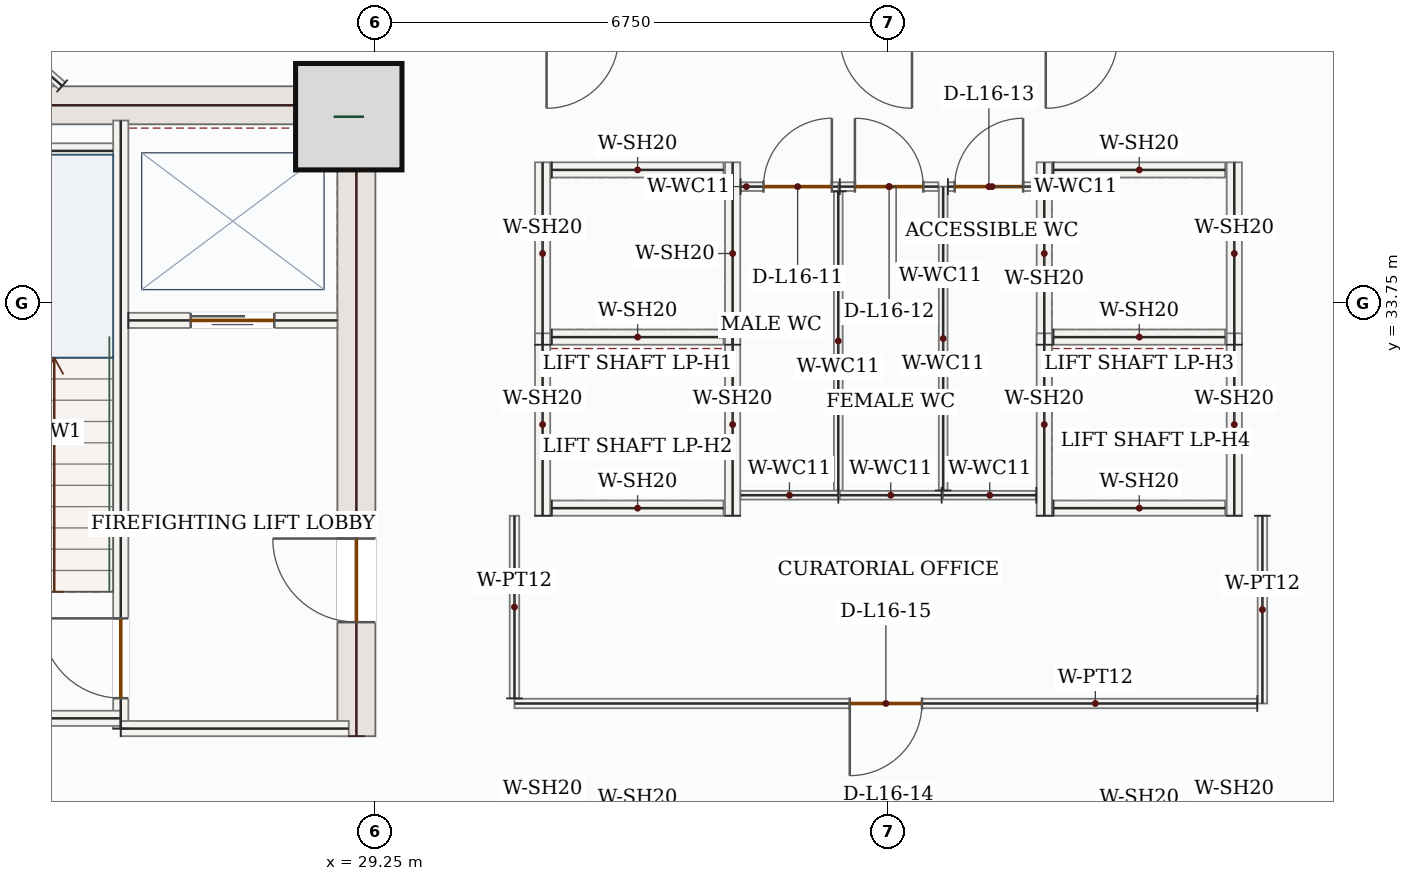
"""IFC4 building model, lengths in metres.
Left out: names, types, materials, properties, quantities, classifications, styles, units other than length and angle.
Written with IfcOpenShell. Run it as: python <this file> out.ifc"""

import sys

from ifc_helpers import new_model, si_unit, direction, frame, frame_2d, origin, origin_2d, place, context, subcontext, project, spatial, rectangle, extrude, source, transform, mapped, element, fill, save


model = new_model("IFC4")
c1 = context("Model", 3, precision=1e-05, world=origin(), true_north=direction((0.0, 1.0)))
c2 = subcontext(c1, "Body", "Model", "MODEL_VIEW")
j1 = project(units=[si_unit("LENGTHUNIT", "METRE"), si_unit("PLANEANGLEUNIT", "RADIAN")], contexts=[c1])
p1 = place(None, origin())
s1 = spatial("IfcSite", under=j1, at=p1, CompositionType="ELEMENT")
p2 = place(p1, origin())
s2 = spatial("IfcBuilding", under=s1, at=p2, CompositionType="ELEMENT")
p3 = place(p2, frame((0.0, 0.0, 75.3)))
s3 = spatial("IfcBuildingStorey", under=s2, at=p3, CompositionType="ELEMENT", Elevation=75.3)
p4 = place(p3, frame((29.0, 28.05, 0.0), z_axis=(0.0, 0.0, 1.0), x_axis=(0.0, 1.0, 0.0)))
e1 = element("IfcWall", 1, at=p4, inside=s3, PredefinedType="SHEAR", context=c2, shape_type="SweptSolid", body=[
    extrude(rectangle(XDim=8.55, YDim=0.5, at=frame_2d((4.275, 0.0))), origin(), (0.0, 0.0, 1.0), 3.95),
])
p5 = place(p4, frame((1.5, 0.0, 0.0)))
e2 = element("IfcOpeningElement", 2, at=p5, cuts=e1, PredefinedType="OPENING", context=c2, shape_type="SweptSolid", body=[
    extrude(rectangle(XDim=1.1, YDim=2.2, at=frame_2d((0.55, 1.1))), frame((0.0, 0.26, 0.0), z_axis=(0.0, -1.0, 0.0), x_axis=(1.0, 0.0, 0.0)), (0.0, 0.0, 1.0), 0.52),
])
m1 = source(origin(), c2, "Body", "SweptSolid", [
    extrude(rectangle(XDim=7.0, YDim=0.5, at=frame_2d((3.5, 0.0))), origin(), (0.0, 0.0, 1.0), 3.95),
])
p6 = place(p3, frame((21.75, 36.35, 0.0), z_axis=(0.0, 0.0, 1.0), x_axis=(1.0, 0.0, 0.0)))
e3 = element("IfcWall", 3, at=p6, inside=s3, PredefinedType="SHEAR", context=c2, shape_type="MappedRepresentation", body=[
    mapped(m1, transform((0.0, 0.0, 0.0), x_axis=(1.0, 0.0, 0.0), y_axis=(0.0, 1.0, 0.0), z_axis=(0.0, 0.0, 1.0), scale=1.0)),
])
m2 = source(origin(), c2, "Body", "SweptSolid", [
    extrude(rectangle(XDim=1.4, YDim=1.4, at=origin_2d()), origin(), (0.0, 0.0, 1.0), 4.2),
])
p7 = place(p3, frame((28.9, 36.2, 0.0), z_axis=(0.0, 0.0, 1.0), x_axis=(1.0, 0.0, 0.0)))
e4 = element("IfcColumn", 4, at=p7, inside=s3, PredefinedType="COLUMN", context=c2, shape_type="MappedRepresentation", body=[
    mapped(m2, transform((0.0, 0.0, 0.0), x_axis=(1.0, 0.0, 0.0), y_axis=(0.0, 1.0, 0.0), z_axis=(0.0, 0.0, 1.0), scale=1.0)),
])
p8 = place(p3, frame((25.9, 28.15, 0.0), z_axis=(0.0, 0.0, 1.0), x_axis=(0.0, 1.0, 0.0)))
e5 = element("IfcWall", 5, at=p8, inside=s3, PredefinedType="SOLIDWALL", context=c2, shape_type="SweptSolid", body=[
    extrude(rectangle(XDim=8.0, YDim=0.2, at=frame_2d((4.0, 0.0))), origin(), (0.0, 0.0, 1.0), 3.95),
])
p9 = place(p8, frame((0.4, 0.0, 0.0)))
e6 = element("IfcOpeningElement", 6, at=p9, cuts=e5, PredefinedType="OPENING", context=c2, shape_type="SweptSolid", body=[
    extrude(rectangle(XDim=1.05, YDim=2.15, at=frame_2d((0.525, 1.075))), frame((0.0, 0.11, 0.0), z_axis=(0.0, -1.0, 0.0), x_axis=(1.0, 0.0, 0.0)), (0.0, 0.0, 1.0), 0.22),
])
m3 = source(origin(), c2, "Body", "SweptSolid", [
    extrude(rectangle(XDim=4.25, YDim=0.2, at=frame_2d((2.125, 0.0))), origin(), (0.0, 0.0, 1.0), 3.95),
])
p10 = place(p3, frame((21.65, 28.285, 0.0), z_axis=(0.0, 0.0, 1.0), x_axis=(1.0, 0.0, 0.0)))
e7 = element("IfcWall", 7, at=p10, inside=s3, PredefinedType="SOLIDWALL", context=c2, shape_type="MappedRepresentation", body=[
    mapped(m3, transform((0.0, 0.0, 0.0), x_axis=(1.0, 0.0, 0.0), y_axis=(0.0, 1.0, 0.0), z_axis=(0.0, 0.0, 1.0), scale=1.0)),
])
m4 = source(origin(), c2, "Body", "SweptSolid", [
    extrude(rectangle(XDim=3.0, YDim=0.2, at=frame_2d((1.5, 0.0))), origin(), (0.0, 0.0, 1.0), 3.95),
])
p11 = place(p3, frame((25.9, 28.15, 0.0), z_axis=(0.0, 0.0, 1.0), x_axis=(1.0, 0.0, 0.0)))
e8 = element("IfcWall", 8, at=p11, inside=s3, PredefinedType="SOLIDWALL", context=c2, shape_type="MappedRepresentation", body=[
    mapped(m4, transform((0.0, 0.0, 0.0), x_axis=(1.0, 0.0, 0.0), y_axis=(0.0, 1.0, 0.0), z_axis=(0.0, 0.0, 1.0), scale=1.0)),
])
m5 = source(origin(), c2, "Body", "SweptSolid", [
    extrude(rectangle(XDim=3.25, YDim=0.2, at=frame_2d((1.625, 0.0))), origin(), (0.0, 0.0, 1.0), 3.95),
])
p12 = place(p3, frame((22.55, 35.75, 0.0), z_axis=(0.0, 0.0, 1.0), x_axis=(1.0, 0.0, 0.0)))
e9 = element("IfcWall", 9, at=p12, inside=s3, PredefinedType="SOLIDWALL", context=c2, shape_type="MappedRepresentation", body=[
    mapped(m5, transform((0.0, 0.0, 0.0), x_axis=(1.0, 0.0, 0.0), y_axis=(0.0, 1.0, 0.0), z_axis=(0.0, 0.0, 1.0), scale=1.0)),
])
p13 = place(p3, frame((26.0, 33.52, 0.0), z_axis=(0.0, 0.0, 1.0), x_axis=(1.0, 0.0, 0.0)))
e10 = element("IfcWall", 10, at=p13, inside=s3, PredefinedType="SOLIDWALL", context=c2, shape_type="SweptSolid", body=[
    extrude(rectangle(XDim=2.75, YDim=0.2, at=frame_2d((1.375, 0.0))), origin(), (0.0, 0.0, 1.0), 3.95),
])
p14 = place(p13, frame((0.82, 0.0, 0.0)))
e11 = element("IfcOpeningElement", 11, at=p14, cuts=e10, PredefinedType="OPENING", context=c2, shape_type="SweptSolid", body=[
    extrude(rectangle(XDim=1.1, YDim=2.15, at=frame_2d((0.55, 1.075))), frame((0.0, 0.11, 0.0), z_axis=(0.0, -1.0, 0.0), x_axis=(1.0, 0.0, 0.0)), (0.0, 0.0, 1.0), 0.22),
])
m6 = source(origin(), c2, "Body", "SweptSolid", [
    extrude(rectangle(XDim=2.4, YDim=0.2, at=frame_2d((1.2, 0.0))), origin(), (0.0, 0.0, 1.0), 3.95),
])
for number, where, z_axis, x_axis in (
    (12, (31.45, 33.2, 0.0), (0.0, 0.0, 1.0), (0.0, 1.0, 0.0)),
    (13, (33.95, 33.2, 0.0), (0.0, 0.0, 1.0), (0.0, 1.0, 0.0)),
):
    element("IfcWall", number, at=place(p3, frame(where, z_axis=z_axis, x_axis=x_axis)), inside=s3, PredefinedType="SOLIDWALL", context=c2, shape_type="MappedRepresentation", body=[
        mapped(m6, transform((0.0, 0.0, 0.0), x_axis=(1.0, 0.0, 0.0), y_axis=(0.0, 1.0, 0.0), z_axis=(0.0, 0.0, 1.0), scale=1.0)),
    ])
m7 = source(origin(), c2, "Body", "SweptSolid", [
    extrude(rectangle(XDim=2.26, YDim=0.2, at=frame_2d((1.13, 0.0))), origin(), (0.0, 0.0, 1.0), 3.95),
])
for number, where, z_axis, x_axis in (
    (14, (31.57, 33.3, 0.0), (0.0, 0.0, 1.0), (1.0, 0.0, 0.0)),
    (15, (31.57, 35.5, 0.0), (0.0, 0.0, 1.0), (1.0, 0.0, 0.0)),
):
    element("IfcWall", number, at=place(p3, frame(where, z_axis=z_axis, x_axis=x_axis)), inside=s3, PredefinedType="SOLIDWALL", context=c2, shape_type="MappedRepresentation", body=[
        mapped(m7, transform((0.0, 0.0, 0.0), x_axis=(1.0, 0.0, 0.0), y_axis=(0.0, 1.0, 0.0), z_axis=(0.0, 0.0, 1.0), scale=1.0)),
    ])
for number, where, z_axis, x_axis in (
    (16, (31.45, 30.95, 0.0), (0.0, 0.0, 1.0), (0.0, 1.0, 0.0)),
    (17, (33.95, 30.95, 0.0), (0.0, 0.0, 1.0), (0.0, 1.0, 0.0)),
):
    element("IfcWall", number, at=place(p3, frame(where, z_axis=z_axis, x_axis=x_axis)), inside=s3, PredefinedType="SOLIDWALL", context=c2, shape_type="MappedRepresentation", body=[
        mapped(m6, transform((0.0, 0.0, 0.0), x_axis=(1.0, 0.0, 0.0), y_axis=(0.0, 1.0, 0.0), z_axis=(0.0, 0.0, 1.0), scale=1.0)),
    ])
p15 = place(p3, frame((31.57, 31.05, 0.0), z_axis=(0.0, 0.0, 1.0), x_axis=(1.0, 0.0, 0.0)))
e18 = element("IfcWall", 18, at=p15, inside=s3, PredefinedType="SOLIDWALL", context=c2, shape_type="MappedRepresentation", body=[
    mapped(m7, transform((0.0, 0.0, 0.0), x_axis=(1.0, 0.0, 0.0), y_axis=(0.0, 1.0, 0.0), z_axis=(0.0, 0.0, 1.0), scale=1.0)),
])
for number, where, z_axis, x_axis in (
    (19, (38.05, 33.2, 0.0), (0.0, 0.0, 1.0), (0.0, 1.0, 0.0)),
    (20, (40.55, 33.2, 0.0), (0.0, 0.0, 1.0), (0.0, 1.0, 0.0)),
):
    element("IfcWall", number, at=place(p3, frame(where, z_axis=z_axis, x_axis=x_axis)), inside=s3, PredefinedType="SOLIDWALL", context=c2, shape_type="MappedRepresentation", body=[
        mapped(m6, transform((0.0, 0.0, 0.0), x_axis=(1.0, 0.0, 0.0), y_axis=(0.0, 1.0, 0.0), z_axis=(0.0, 0.0, 1.0), scale=1.0)),
    ])
for number, where, z_axis, x_axis in (
    (21, (38.17, 33.3, 0.0), (0.0, 0.0, 1.0), (1.0, 0.0, 0.0)),
    (22, (38.17, 35.5, 0.0), (0.0, 0.0, 1.0), (1.0, 0.0, 0.0)),
):
    element("IfcWall", number, at=place(p3, frame(where, z_axis=z_axis, x_axis=x_axis)), inside=s3, PredefinedType="SOLIDWALL", context=c2, shape_type="MappedRepresentation", body=[
        mapped(m7, transform((0.0, 0.0, 0.0), x_axis=(1.0, 0.0, 0.0), y_axis=(0.0, 1.0, 0.0), z_axis=(0.0, 0.0, 1.0), scale=1.0)),
    ])
for number, where, z_axis, x_axis in (
    (23, (38.05, 30.95, 0.0), (0.0, 0.0, 1.0), (0.0, 1.0, 0.0)),
    (24, (40.55, 30.95, 0.0), (0.0, 0.0, 1.0), (0.0, 1.0, 0.0)),
):
    element("IfcWall", number, at=place(p3, frame(where, z_axis=z_axis, x_axis=x_axis)), inside=s3, PredefinedType="SOLIDWALL", context=c2, shape_type="MappedRepresentation", body=[
        mapped(m6, transform((0.0, 0.0, 0.0), x_axis=(1.0, 0.0, 0.0), y_axis=(0.0, 1.0, 0.0), z_axis=(0.0, 0.0, 1.0), scale=1.0)),
    ])
p16 = place(p3, frame((38.17, 31.05, 0.0), z_axis=(0.0, 0.0, 1.0), x_axis=(1.0, 0.0, 0.0)))
e25 = element("IfcWall", 25, at=p16, inside=s3, PredefinedType="SOLIDWALL", context=c2, shape_type="MappedRepresentation", body=[
    mapped(m7, transform((0.0, 0.0, 0.0), x_axis=(1.0, 0.0, 0.0), y_axis=(0.0, 1.0, 0.0), z_axis=(0.0, 0.0, 1.0), scale=1.0)),
])
m8 = source(origin(), c2, "Body", "SweptSolid", [
    extrude(rectangle(XDim=1.225, YDim=0.115, at=frame_2d((0.613, 0.0))), origin(), (0.0, 0.0, 1.0), 3.95),
])
p17 = place(p3, frame((37.945, 31.22, 0.0), z_axis=(0.0, 0.0, 1.0), x_axis=(-1.0, 0.0, 0.0)))
e26 = element("IfcWall", 26, at=p17, inside=s3, PredefinedType="PARTITIONING", context=c2, shape_type="MappedRepresentation", body=[
    mapped(m8, transform((0.0, 0.0, 0.0), x_axis=(1.0, 0.0, 0.0), y_axis=(0.0, 1.0, 0.0), z_axis=(0.0, 0.0, 1.0), scale=1.0)),
])
m9 = source(origin(), c2, "Body", "SweptSolid", [
    extrude(rectangle(XDim=3.998, YDim=0.115, at=frame_2d((1.999, 0.0))), origin(), (0.0, 0.0, 1.0), 3.95),
])
p18 = place(p3, frame((36.72, 31.282, 0.0), z_axis=(0.0, 0.0, 1.0), x_axis=(0.0, 1.0, 0.0)))
e27 = element("IfcWall", 27, at=p18, inside=s3, PredefinedType="PARTITIONING", context=c2, shape_type="MappedRepresentation", body=[
    mapped(m9, transform((0.0, 0.0, 0.0), x_axis=(1.0, 0.0, 0.0), y_axis=(0.0, 1.0, 0.0), z_axis=(0.0, 0.0, 1.0), scale=1.0)),
])
p19 = place(p3, frame((36.782, 35.28, 0.0), z_axis=(0.0, 0.0, 1.0), x_axis=(1.0, 0.0, 0.0)))
e28 = element("IfcWall", 28, at=p19, inside=s3, PredefinedType="PARTITIONING", context=c2, shape_type="SweptSolid", body=[
    extrude(rectangle(XDim=1.163, YDim=0.115, at=frame_2d((0.581, 0.0))), origin(), (0.0, 0.0, 1.0), 3.95),
])
p20 = place(p19, frame((0.089, 0.0, 0.0)))
e29 = element("IfcOpeningElement", 29, at=p20, cuts=e28, PredefinedType="OPENING", context=c2, shape_type="SweptSolid", body=[
    extrude(rectangle(XDim=0.9, YDim=2.1, at=frame_2d((0.45, 1.05))), frame((0.0, 0.067, 0.0), z_axis=(0.0, -1.0, 0.0), x_axis=(1.0, 0.0, 0.0)), (0.0, 0.0, 1.0), 0.135),
])
m10 = source(origin(), c2, "Body", "SweptSolid", [
    extrude(rectangle(XDim=1.285, YDim=0.115, at=frame_2d((0.643, 0.0))), origin(), (0.0, 0.0, 1.0), 3.95),
])
p21 = place(p3, frame((35.34, 31.22, 0.0), z_axis=(0.0, 0.0, 1.0), x_axis=(-1.0, 0.0, 0.0)))
e30 = element("IfcWall", 30, at=p21, inside=s3, PredefinedType="PARTITIONING", context=c2, shape_type="MappedRepresentation", body=[
    mapped(m10, transform((0.0, 0.0, 0.0), x_axis=(1.0, 0.0, 0.0), y_axis=(0.0, 1.0, 0.0), z_axis=(0.0, 0.0, 1.0), scale=1.0)),
])
p22 = place(p3, frame((34.055, 35.28, 0.0), z_axis=(0.0, 0.0, 1.0), x_axis=(1.0, 0.0, 0.0)))
e31 = element("IfcWall", 31, at=p22, inside=s3, PredefinedType="PARTITIONING", context=c2, shape_type="SweptSolid", body=[
    extrude(rectangle(XDim=1.285, YDim=0.115, at=frame_2d((0.643, 0.0))), origin(), (0.0, 0.0, 1.0), 3.95),
])
p23 = place(p22, frame((0.3, 0.0, 0.0)))
e32 = element("IfcOpeningElement", 32, at=p23, cuts=e31, PredefinedType="OPENING", context=c2, shape_type="SweptSolid", body=[
    extrude(rectangle(XDim=0.9, YDim=2.1, at=frame_2d((0.45, 1.05))), frame((0.0, 0.067, 0.0), z_axis=(0.0, -1.0, 0.0), x_axis=(1.0, 0.0, 0.0)), (0.0, 0.0, 1.0), 0.135),
])
m11 = source(origin(), c2, "Body", "SweptSolid", [
    extrude(rectangle(XDim=3.935, YDim=0.115, at=frame_2d((1.968, 0.0))), origin(), (0.0, 0.0, 1.0), 3.95),
])
p24 = place(p3, frame((35.34, 35.218, 0.0), z_axis=(0.0, 0.0, 1.0), x_axis=(0.0, -1.0, 0.0)))
e33 = element("IfcWall", 33, at=p24, inside=s3, PredefinedType="PARTITIONING", context=c2, shape_type="MappedRepresentation", body=[
    mapped(m11, transform((0.0, 0.0, 0.0), x_axis=(1.0, 0.0, 0.0), y_axis=(0.0, 1.0, 0.0), z_axis=(0.0, 0.0, 1.0), scale=1.0)),
])
m12 = source(origin(), c2, "Body", "SweptSolid", [
    extrude(rectangle(XDim=1.34, YDim=0.115, at=frame_2d((0.67, 0.0))), origin(), (0.0, 0.0, 1.0), 3.95),
])
p25 = place(p3, frame((36.7, 31.22, 0.0), z_axis=(0.0, 0.0, 1.0), x_axis=(-1.0, 0.0, 0.0)))
e34 = element("IfcWall", 34, at=p25, inside=s3, PredefinedType="PARTITIONING", context=c2, shape_type="MappedRepresentation", body=[
    mapped(m12, transform((0.0, 0.0, 0.0), x_axis=(1.0, 0.0, 0.0), y_axis=(0.0, 1.0, 0.0), z_axis=(0.0, 0.0, 1.0), scale=1.0)),
])
p26 = place(p3, frame((35.36, 35.28, 0.0), z_axis=(0.0, 0.0, 1.0), x_axis=(1.0, 0.0, 0.0)))
e35 = element("IfcWall", 35, at=p26, inside=s3, PredefinedType="PARTITIONING", context=c2, shape_type="SweptSolid", body=[
    extrude(rectangle(XDim=1.297, YDim=0.115, at=frame_2d((0.649, 0.0))), origin(), (0.0, 0.0, 1.0), 3.95),
])
p27 = place(p26, frame((0.199, 0.0, 0.0)))
e36 = element("IfcOpeningElement", 36, at=p27, cuts=e35, PredefinedType="OPENING", context=c2, shape_type="SweptSolid", body=[
    extrude(rectangle(XDim=0.9, YDim=2.1, at=frame_2d((0.45, 1.05))), frame((0.0, 0.067, 0.0), z_axis=(0.0, -1.0, 0.0), x_axis=(1.0, 0.0, 0.0)), (0.0, 0.0, 1.0), 0.135),
])
m13 = source(origin(), c2, "Body", "SweptSolid", [
    extrude(rectangle(XDim=2.47, YDim=0.125, at=frame_2d((1.235, 0.0))), origin(), (0.0, 0.0, 1.0), 3.95),
])
p28 = place(p3, frame((40.92, 30.95, 0.0), z_axis=(0.0, 0.0, 1.0), x_axis=(0.0, -1.0, 0.0)))
e37 = element("IfcWall", 37, at=p28, inside=s3, PredefinedType="PARTITIONING", context=c2, shape_type="MappedRepresentation", body=[
    mapped(m13, transform((0.0, 0.0, 0.0), x_axis=(1.0, 0.0, 0.0), y_axis=(0.0, 1.0, 0.0), z_axis=(0.0, 0.0, 1.0), scale=1.0)),
])
p29 = place(p3, frame((40.853, 28.48, 0.0), z_axis=(0.0, 0.0, 1.0), x_axis=(-1.0, 0.0, 0.0)))
e38 = element("IfcWall", 38, at=p29, inside=s3, PredefinedType="PARTITIONING", context=c2, shape_type="SweptSolid", body=[
    extrude(rectangle(XDim=9.772, YDim=0.125, at=frame_2d((4.886, 0.0))), origin(), (0.0, 0.0, 1.0), 3.95),
])
p30 = place(p29, frame((4.411, 0.0, 0.0)))
e39 = element("IfcOpeningElement", 39, at=p30, cuts=e38, PredefinedType="OPENING", context=c2, shape_type="SweptSolid", body=[
    extrude(rectangle(XDim=0.95, YDim=2.15, at=frame_2d((0.475, 1.075))), frame((0.0, 0.073, 0.0), z_axis=(0.0, -1.0, 0.0), x_axis=(1.0, 0.0, 0.0)), (0.0, 0.0, 1.0), 0.145),
])
m14 = source(origin(), c2, "Body", "SweptSolid", [
    extrude(rectangle(XDim=2.402, YDim=0.125, at=frame_2d((1.201, 0.0))), origin(), (0.0, 0.0, 1.0), 3.95),
])
p31 = place(p3, frame((31.08, 28.548, 0.0), z_axis=(0.0, 0.0, 1.0), x_axis=(0.0, 1.0, 0.0)))
e40 = element("IfcWall", 40, at=p31, inside=s3, PredefinedType="PARTITIONING", context=c2, shape_type="MappedRepresentation", body=[
    mapped(m14, transform((0.0, 0.0, 0.0), x_axis=(1.0, 0.0, 0.0), y_axis=(0.0, 1.0, 0.0), z_axis=(0.0, 0.0, 1.0), scale=1.0)),
])
m15 = source(origin(), c2, "Body", "SweptSolid", [
    extrude(rectangle(XDim=3.467, YDim=0.125, at=frame_2d((1.733, 0.0))), origin(), (0.0, 0.0, 1.0), 3.95),
])
p32 = place(p3, frame((25.129, 36.605, 0.0), z_axis=(0.0, 0.0, 1.0), x_axis=(-0.751135268809, 0.66014832269, 0.0)))
e41 = element("IfcWall", 41, at=p32, inside=s3, PredefinedType="PARTITIONING", context=c2, shape_type="MappedRepresentation", body=[
    mapped(m15, transform((0.0, 0.0, 0.0), x_axis=(1.0, 0.0, 0.0), y_axis=(0.0, 1.0, 0.0), z_axis=(0.0, 0.0, 1.0), scale=1.0)),
])
m16 = source(origin(), c2, "Body", "SweptSolid", [
    extrude(rectangle(XDim=1.05, YDim=2.15, at=frame_2d((0.525, 1.075))), frame((0.0, 0.025, 0.0), z_axis=(0.0, -1.0, 0.0), x_axis=(1.0, 0.0, 0.0)), (0.0, 0.0, 1.0), 0.05),
])
p33 = place(p9, origin())
e42 = element("IfcDoor", 42, at=p33, inside=s3, OperationType="SINGLE_SWING_RIGHT", PredefinedType="DOOR", context=c2, shape_type="MappedRepresentation", body=[
    mapped(m16, transform((0.0, 0.0, 0.0), x_axis=(1.0, 0.0, 0.0), y_axis=(0.0, 1.0, 0.0), z_axis=(0.0, 0.0, 1.0), scale=1.0)),
])
fill(e6, e42)
m17 = source(origin(), c2, "Body", "SweptSolid", [
    extrude(rectangle(XDim=1.1, YDim=2.15, at=frame_2d((0.55, 1.075))), frame((0.0, 0.025, 0.0), z_axis=(0.0, -1.0, 0.0), x_axis=(1.0, 0.0, 0.0)), (0.0, 0.0, 1.0), 0.05),
])
p34 = place(p14, origin())
e43 = element("IfcDoor", 43, at=p34, inside=s3, OperationType="DOUBLE_DOOR_SLIDING", PredefinedType="DOOR", context=c2, shape_type="MappedRepresentation", body=[
    mapped(m17, transform((0.0, 0.0, 0.0), x_axis=(1.0, 0.0, 0.0), y_axis=(0.0, 1.0, 0.0), z_axis=(0.0, 0.0, 1.0), scale=1.0)),
])
fill(e11, e43)
m18 = source(origin(), c2, "Body", "SweptSolid", [
    extrude(rectangle(XDim=1.1, YDim=2.2, at=frame_2d((0.55, 1.1))), frame((0.0, 0.025, 0.0), z_axis=(0.0, -1.0, 0.0), x_axis=(1.0, 0.0, 0.0)), (0.0, 0.0, 1.0), 0.05),
])
p35 = place(p5, origin())
e44 = element("IfcDoor", 44, at=p35, inside=s3, OperationType="SINGLE_SWING_RIGHT", PredefinedType="DOOR", context=c2, shape_type="MappedRepresentation", body=[
    mapped(m18, transform((0.0, 0.0, 0.0), x_axis=(1.0, 0.0, 0.0), y_axis=(0.0, 1.0, 0.0), z_axis=(0.0, 0.0, 1.0), scale=1.0)),
])
fill(e2, e44)
m19 = source(origin(), c2, "Body", "SweptSolid", [
    extrude(rectangle(XDim=0.9, YDim=2.1, at=frame_2d((0.45, 1.05))), frame((0.0, 0.025, 0.0), z_axis=(0.0, -1.0, 0.0), x_axis=(1.0, 0.0, 0.0)), (0.0, 0.0, 1.0), 0.05),
])
p36 = place(p23, origin())
e45 = element("IfcDoor", 45, at=p36, inside=s3, OperationType="SINGLE_SWING_RIGHT", PredefinedType="DOOR", context=c2, shape_type="MappedRepresentation", body=[
    mapped(m19, transform((0.0, 0.0, 0.0), x_axis=(1.0, 0.0, 0.0), y_axis=(0.0, 1.0, 0.0), z_axis=(0.0, 0.0, 1.0), scale=1.0)),
])
fill(e32, e45)
p37 = place(p27, origin())
e46 = element("IfcDoor", 46, at=p37, inside=s3, OperationType="SINGLE_SWING_LEFT", PredefinedType="DOOR", context=c2, shape_type="MappedRepresentation", body=[
    mapped(m19, transform((0.0, 0.0, 0.0), x_axis=(1.0, 0.0, 0.0), y_axis=(0.0, 1.0, 0.0), z_axis=(0.0, 0.0, 1.0), scale=1.0)),
])
fill(e36, e46)
p38 = place(p20, origin())
e47 = element("IfcDoor", 47, at=p38, inside=s3, OperationType="SINGLE_SWING_RIGHT", PredefinedType="DOOR", context=c2, shape_type="MappedRepresentation", body=[
    mapped(m19, transform((0.0, 0.0, 0.0), x_axis=(1.0, 0.0, 0.0), y_axis=(0.0, 1.0, 0.0), z_axis=(0.0, 0.0, 1.0), scale=1.0)),
])
fill(e29, e47)
m20 = source(origin(), c2, "Body", "SweptSolid", [
    extrude(rectangle(XDim=0.95, YDim=2.15, at=frame_2d((0.475, 1.075))), frame((0.0, 0.025, 0.0), z_axis=(0.0, -1.0, 0.0), x_axis=(1.0, 0.0, 0.0)), (0.0, 0.0, 1.0), 0.05),
])
p39 = place(p30, origin())
e48 = element("IfcDoor", 48, at=p39, inside=s3, OperationType="SINGLE_SWING_RIGHT", PredefinedType="DOOR", context=c2, shape_type="MappedRepresentation", body=[
    mapped(m20, transform((0.0, 0.0, 0.0), x_axis=(1.0, 0.0, 0.0), y_axis=(0.0, 1.0, 0.0), z_axis=(0.0, 0.0, 1.0), scale=1.0)),
])
fill(e39, e48)
save(model, sys.argv[1])
